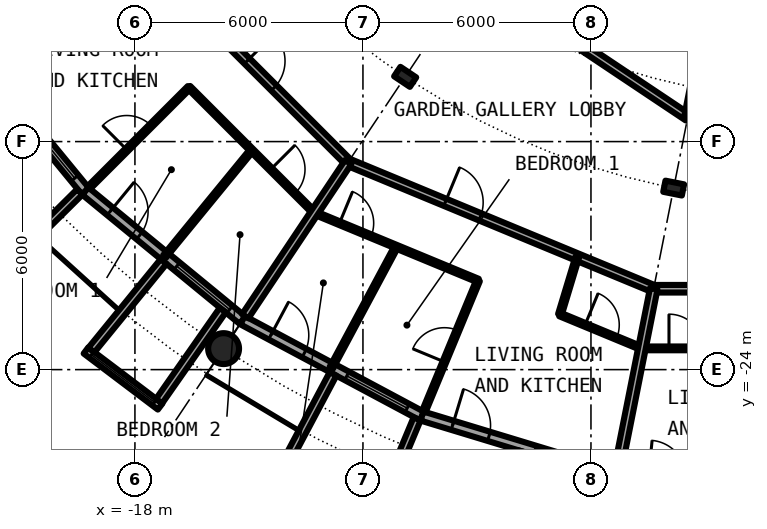
"""IFC4 building model, lengths in metres.
Left out: names, types, materials, properties, quantities, classifications, styles, units other than length and angle.
Written with IfcOpenShell. Run it as: python <this file> out.ifc"""

import sys

from ifc_helpers import new_model, si_unit, direction, frame, frame_2d, origin, origin_2d, place, context, subcontext, project, spatial, rectangle, circle, hollow_circle, i_section, extrude, element, fill, save


model = new_model("IFC4")
c1 = context("Model", 3, precision=1e-05, world=origin(), true_north=direction((0.0, 1.0)))
c2 = subcontext(c1, "Body", "Model", "MODEL_VIEW")
j1 = project(units=[si_unit("LENGTHUNIT", "METRE"), si_unit("PLANEANGLEUNIT", "RADIAN")], contexts=[c1])
p1 = place(None, origin())
s1 = spatial("IfcSite", under=j1, at=p1, CompositionType="ELEMENT")
p2 = place(p1, origin())
s2 = spatial("IfcBuilding", under=s1, at=p2, CompositionType="ELEMENT")
p3 = place(p2, frame((0.0, 0.0, 170.75)))
s3 = spatial("IfcBuildingStorey", under=s2, at=p3, CompositionType="ELEMENT", Elevation=170.75)
p4 = place(p3, frame((-15.667, -23.448, 0.0), z_axis=(0.0, 0.0, 1.0), x_axis=(1.0, 0.0, 0.0)))
e1 = element("IfcColumn", 1, at=p4, inside=s3, PredefinedType="COLUMN", context=c2, shape_type="SweptSolid", body=[
    extrude(hollow_circle(Radius=0.406, WallThickness=0.04, at=origin_2d()), origin(), (0.0, 0.0, 1.0), 3.05),
])
for number, where, z_axis, x_axis in (
    (2, (-10.889, -16.297, 0.0), (0.0, 0.0, 1.0), (-0.556, -0.831, 0.0)),
    (3, (-3.824, -19.223, 0.0), (0.0, 0.0, 1.0), (-0.195, -0.981, 0.0)),
):
    element("IfcColumn", number, at=place(p3, frame(where, z_axis=z_axis, x_axis=x_axis)), inside=s3, PredefinedType="COLUMN", context=c2, shape_type="SweptSolid", body=[
        extrude(i_section(OverallWidth=0.3, OverallDepth=0.5, WebThickness=0.014, FlangeThickness=0.028, FilletRadius=0.027, at=origin_2d()), origin(), (0.0, 0.0, 1.0), 3.05),
    ])
p5 = place(p3, frame((-22.699, -15.167, 0.0), z_axis=(0.0, 0.0, 1.0), x_axis=(0.634382322723, -0.773019449054, 0.0)))
e4 = element("IfcWall", 4, at=p5, inside=s3, PredefinedType="SOLIDWALL", context=c2, shape_type="SweptSolid", body=[
    extrude(rectangle(XDim=5.352, YDim=0.25, at=frame_2d((2.676, 0.0))), origin(), (0.0, 0.0, 1.0), 2.7),
])
p6 = place(p5, frame((0.841, 0.0, 0.0)))
e5 = element("IfcOpeningElement", 5, at=p6, cuts=e4, PredefinedType="OPENING", context=c2, shape_type="SweptSolid", body=[
    extrude(rectangle(XDim=1.0, YDim=2.2, at=frame_2d((0.5, 1.1))), frame((0.0, 0.135, 0.0), z_axis=(0.0, -1.0, 0.0), x_axis=(1.0, 0.0, 0.0)), (0.0, 0.0, 1.0), 0.27),
])
p7 = place(p5, frame((3.111, 0.0, 0.3)))
e6 = element("IfcOpeningElement", 6, at=p7, cuts=e4, PredefinedType="OPENING", context=c2, shape_type="SweptSolid", body=[
    extrude(rectangle(XDim=1.8, YDim=2.1, at=frame_2d((0.9, 1.05))), frame((0.0, 0.135, 0.0), z_axis=(0.0, -1.0, 0.0), x_axis=(1.0, 0.0, 0.0)), (0.0, 0.0, 1.0), 0.27),
])
p8 = place(p3, frame((-19.45, -19.323, -0.03), z_axis=(0.0, 0.0, 1.0), x_axis=(-0.709727076896, -0.704476739375, 0.0)))
e7 = element("IfcWall", 7, at=p8, inside=s3, PredefinedType="SOLIDWALL", context=c2, shape_type="SweptSolid", body=[
    extrude(rectangle(XDim=2.883, YDim=0.2, at=frame_2d((1.441, 0.0))), origin(), (0.0, 0.0, 1.0), 2.73),
])
p9 = place(p3, frame((-19.304, -19.304, 0.0), z_axis=(0.0, 0.0, 1.0), x_axis=(0.773019449054, -0.634382322723, 0.0)))
e8 = element("IfcWall", 8, at=p9, inside=s3, PredefinedType="SOLIDWALL", context=c2, shape_type="SweptSolid", body=[
    extrude(rectangle(XDim=5.352, YDim=0.25, at=frame_2d((2.676, 0.0))), origin(), (0.0, 0.0, 1.0), 2.7),
])
p10 = place(p9, frame((0.841, 0.0, 0.0)))
e9 = element("IfcOpeningElement", 9, at=p10, cuts=e8, PredefinedType="OPENING", context=c2, shape_type="SweptSolid", body=[
    extrude(rectangle(XDim=1.0, YDim=2.2, at=frame_2d((0.5, 1.1))), frame((0.0, 0.135, 0.0), z_axis=(0.0, -1.0, 0.0), x_axis=(1.0, 0.0, 0.0)), (0.0, 0.0, 1.0), 0.27),
])
p11 = place(p9, frame((3.111, 0.0, 0.3)))
e10 = element("IfcOpeningElement", 10, at=p11, cuts=e8, PredefinedType="OPENING", context=c2, shape_type="SweptSolid", body=[
    extrude(rectangle(XDim=1.8, YDim=2.1, at=frame_2d((0.9, 1.05))), frame((0.0, 0.135, 0.0), z_axis=(0.0, -1.0, 0.0), x_axis=(1.0, 0.0, 0.0)), (0.0, 0.0, 1.0), 0.27),
])
p12 = place(p3, frame((-19.289, -23.497, -0.03), z_axis=(0.0, 0.0, 1.0), x_axis=(0.797887588059, -0.602806268067, 0.0)))
e11 = element("IfcWall", 11, at=p12, inside=s3, PredefinedType="SOLIDWALL", context=c2, shape_type="SweptSolid", body=[
    extrude(rectangle(XDim=2.447, YDim=0.2, at=frame_2d((1.223, 0.0))), origin(), (0.0, 0.0, 1.0), 2.73),
])
p13 = place(p12, frame((0.183, 0.0, 0.33)))
e12 = element("IfcOpeningElement", 12, at=p13, cuts=e11, PredefinedType="OPENING", context=c2, shape_type="SweptSolid", body=[
    extrude(circle(Radius=1.04, at=frame_2d((1.04, 1.04))), frame((0.0, 0.11, 0.0), z_axis=(0.0, -1.0, 0.0), x_axis=(1.0, 0.0, 0.0)), (0.0, 0.0, 1.0), 0.22),
])
p14 = place(p3, frame((-17.246, -21.155, -0.03), z_axis=(0.0, 0.0, 1.0), x_axis=(-0.631741648902, -0.775179004516, 0.0)))
e13 = element("IfcWall", 13, at=p14, inside=s3, PredefinedType="SOLIDWALL", context=c2, shape_type="SweptSolid", body=[
    extrude(rectangle(XDim=3.006, YDim=0.2, at=frame_2d((1.503, 0.0))), origin(), (0.0, 0.0, 1.0), 2.73),
])
p15 = place(p3, frame((-15.688, -22.433, -0.03), z_axis=(0.0, 0.0, 1.0), x_axis=(-0.573260687834, -0.819373043115, 0.0)))
e14 = element("IfcWall", 14, at=p15, inside=s3, PredefinedType="SOLIDWALL", context=c2, shape_type="SweptSolid", body=[
    extrude(rectangle(XDim=2.925, YDim=0.2, at=frame_2d((1.463, 0.0))), origin(), (0.0, 0.0, 1.0), 2.73),
])
p16 = place(p3, frame((-15.167, -22.699, 0.0), z_axis=(0.0, 0.0, 1.0), x_axis=(0.881915646801, -0.471407246368, 0.0)))
e15 = element("IfcWall", 15, at=p16, inside=s3, PredefinedType="SOLIDWALL", context=c2, shape_type="SweptSolid", body=[
    extrude(rectangle(XDim=5.352, YDim=0.25, at=frame_2d((2.676, 0.0))), origin(), (0.0, 0.0, 1.0), 2.7),
])
p17 = place(p16, frame((0.841, 0.0, 0.0)))
e16 = element("IfcOpeningElement", 16, at=p17, cuts=e15, PredefinedType="OPENING", context=c2, shape_type="SweptSolid", body=[
    extrude(rectangle(XDim=1.0, YDim=2.2, at=frame_2d((0.5, 1.1))), frame((0.0, 0.135, 0.0), z_axis=(0.0, -1.0, 0.0), x_axis=(1.0, 0.0, 0.0)), (0.0, 0.0, 1.0), 0.27),
])
p18 = place(p16, frame((3.111, 0.0, 0.3)))
e17 = element("IfcOpeningElement", 17, at=p18, cuts=e15, PredefinedType="OPENING", context=c2, shape_type="SweptSolid", body=[
    extrude(rectangle(XDim=1.8, YDim=2.1, at=frame_2d((0.9, 1.05))), frame((0.0, 0.135, 0.0), z_axis=(0.0, -1.0, 0.0), x_axis=(1.0, 0.0, 0.0)), (0.0, 0.0, 1.0), 0.27),
])
p19 = place(p3, frame((-12.787, -24.113, -0.03), z_axis=(0.0, 0.0, 1.0), x_axis=(-0.468365282436, -0.883534924159, 0.0)))
e18 = element("IfcWall", 18, at=p19, inside=s3, PredefinedType="SOLIDWALL", context=c2, shape_type="SweptSolid", body=[
    extrude(rectangle(XDim=3.006, YDim=0.2, at=frame_2d((1.503, 0.0))), origin(), (0.0, 0.0, 1.0), 2.73),
])
p20 = place(p3, frame((-10.575, -25.295, -0.03), z_axis=(0.0, 0.0, 1.0), x_axis=(-0.385697364644, -0.922625353492, 0.0)))
e19 = element("IfcWall", 19, at=p20, inside=s3, PredefinedType="SOLIDWALL", context=c2, shape_type="SweptSolid", body=[
    extrude(rectangle(XDim=2.883, YDim=0.2, at=frame_2d((1.442, 0.0))), origin(), (0.0, 0.0, 1.0), 2.73),
])
p21 = place(p3, frame((-10.447, -25.222, 0.0), z_axis=(0.0, 0.0, 1.0), x_axis=(0.956965678721, -0.290201119486, 0.0)))
e20 = element("IfcWall", 20, at=p21, inside=s3, PredefinedType="SOLIDWALL", context=c2, shape_type="SweptSolid", body=[
    extrude(rectangle(XDim=5.351, YDim=0.25, at=frame_2d((2.676, 0.0))), origin(), (0.0, 0.0, 1.0), 2.7),
])
p22 = place(p21, frame((0.841, 0.0, 0.0)))
e21 = element("IfcOpeningElement", 21, at=p22, cuts=e20, PredefinedType="OPENING", context=c2, shape_type="SweptSolid", body=[
    extrude(rectangle(XDim=1.0, YDim=2.2, at=frame_2d((0.5, 1.1))), frame((0.0, 0.135, 0.0), z_axis=(0.0, -1.0, 0.0), x_axis=(1.0, 0.0, 0.0)), (0.0, 0.0, 1.0), 0.27),
])
p23 = place(p21, frame((3.111, 0.0, 0.3)))
e22 = element("IfcOpeningElement", 22, at=p23, cuts=e20, PredefinedType="OPENING", context=c2, shape_type="SweptSolid", body=[
    extrude(rectangle(XDim=1.8, YDim=2.1, at=frame_2d((0.9, 1.05))), frame((0.0, 0.135, 0.0), z_axis=(0.0, -1.0, 0.0), x_axis=(1.0, 0.0, 0.0)), (0.0, 0.0, 1.0), 0.27),
])
p24 = place(p3, frame((-16.581, -16.571, 0.0), z_axis=(0.0, 0.0, 1.0), x_axis=(0.706923494552, -0.707290020325, 0.0)))
e23 = element("IfcWall", 23, at=p24, inside=s3, PredefinedType="PARTITIONING", context=c2, shape_type="SweptSolid", body=[
    extrude(rectangle(XDim=4.663, YDim=0.1, at=frame_2d((2.331, 0.0))), origin(), (0.0, 0.0, 1.0), 2.7),
])
p25 = place(p24, frame((3.051, 0.0, 0.0)))
e24 = element("IfcOpeningElement", 24, at=p25, cuts=e23, PredefinedType="OPENING", context=c2, shape_type="SweptSolid", body=[
    extrude(rectangle(XDim=0.9, YDim=2.3, at=frame_2d((0.45, 1.15))), frame((0.0, 0.06, 0.0), z_axis=(0.0, -1.0, 0.0), x_axis=(1.0, 0.0, 0.0)), (0.0, 0.0, 1.0), 0.12),
])
p26 = place(p3, frame((-13.278, -19.873, 0.0), z_axis=(0.0, 0.0, 1.0), x_axis=(0.923920484476, -0.38258455061, 0.0)))
e25 = element("IfcWall", 25, at=p26, inside=s3, PredefinedType="PARTITIONING", context=c2, shape_type="SweptSolid", body=[
    extrude(rectangle(XDim=4.663, YDim=0.1, at=frame_2d((2.332, 0.0))), origin(), (0.0, 0.0, 1.0), 2.7),
])
p27 = place(p26, frame((0.715, 0.0, 0.0)))
e26 = element("IfcOpeningElement", 26, at=p27, cuts=e25, PredefinedType="OPENING", context=c2, shape_type="SweptSolid", body=[
    extrude(rectangle(XDim=0.9, YDim=2.3, at=frame_2d((0.45, 1.15))), frame((0.0, 0.06, 0.0), z_axis=(0.0, -1.0, 0.0), x_axis=(1.0, 0.0, 0.0)), (0.0, 0.0, 1.0), 0.12),
])
p28 = place(p3, frame((-6.817, -22.549, 0.0), z_axis=(0.0, 0.0, 1.0), x_axis=(0.923923664861, -0.382576870068, 0.0)))
e27 = element("IfcWall", 27, at=p28, inside=s3, PredefinedType="PARTITIONING", context=c2, shape_type="SweptSolid", body=[
    extrude(rectangle(XDim=2.331, YDim=0.1, at=frame_2d((1.166, 0.0))), origin(), (0.0, 0.0, 1.0), 2.7),
])
p29 = place(p28, frame((0.716, 0.0, 0.0)))
e28 = element("IfcOpeningElement", 28, at=p29, cuts=e27, PredefinedType="OPENING", context=c2, shape_type="SweptSolid", body=[
    extrude(rectangle(XDim=0.9, YDim=2.3, at=frame_2d((0.45, 1.15))), frame((0.0, 0.06, 0.0), z_axis=(0.0, -1.0, 0.0), x_axis=(1.0, 0.0, 0.0)), (0.0, 0.0, 1.0), 0.12),
])
p30 = place(p3, frame((-4.663, -23.441, 0.0), z_axis=(0.0, 0.0, 1.0), x_axis=(1.0, 0.0, 0.0)))
e29 = element("IfcWall", 29, at=p30, inside=s3, PredefinedType="PARTITIONING", context=c2, shape_type="SweptSolid", body=[
    extrude(rectangle(XDim=2.332, YDim=0.1, at=frame_2d((1.166, 0.0))), origin(), (0.0, 0.0, 1.0), 2.7),
])
p31 = place(p30, frame((0.716, 0.0, 0.0)))
e30 = element("IfcOpeningElement", 30, at=p31, cuts=e29, PredefinedType="OPENING", context=c2, shape_type="SweptSolid", body=[
    extrude(rectangle(XDim=0.9, YDim=2.3, at=frame_2d((0.45, 1.15))), frame((0.0, 0.06, 0.0), z_axis=(0.0, -1.0, 0.0), x_axis=(1.0, 0.0, 0.0)), (0.0, 0.0, 1.0), 0.12),
])
p32 = place(p3, frame((-18.542, -12.389, 0.0), z_axis=(0.0, 0.0, 1.0), x_axis=(0.707106781187, -0.707106781187, 0.0)))
e31 = element("IfcWall", 31, at=p32, inside=s3, PredefinedType="PARTITIONING", context=c2, shape_type="SweptSolid", body=[
    extrude(rectangle(XDim=8.702, YDim=0.2, at=frame_2d((4.351, 0.0))), origin(), (0.0, 0.0, 1.0), 2.7),
])
p33 = place(p32, frame((4.938, 0.0, 0.0)))
e32 = element("IfcOpeningElement", 32, at=p33, cuts=e31, PredefinedType="OPENING", context=c2, shape_type="SweptSolid", body=[
    extrude(rectangle(XDim=1.0, YDim=2.3, at=frame_2d((0.5, 1.15))), frame((0.0, 0.11, 0.0), z_axis=(0.0, -1.0, 0.0), x_axis=(1.0, 0.0, 0.0)), (0.0, 0.0, 1.0), 0.22),
])
p34 = place(p3, frame((-12.389, -18.542, 0.0), z_axis=(0.0, 0.0, 1.0), x_axis=(0.923867858178, -0.382711615483, 0.0)))
e33 = element("IfcWall", 33, at=p34, inside=s3, PredefinedType="PARTITIONING", context=c2, shape_type="SweptSolid", body=[
    extrude(rectangle(XDim=8.709, YDim=0.2, at=frame_2d((4.354, 0.0))), origin(), (0.0, 0.0, 1.0), 2.7),
])
p35 = place(p34, frame((2.763, 0.0, 0.0)))
e34 = element("IfcOpeningElement", 34, at=p35, cuts=e33, PredefinedType="OPENING", context=c2, shape_type="SweptSolid", body=[
    extrude(rectangle(XDim=1.0, YDim=2.3, at=frame_2d((0.5, 1.15))), frame((0.0, 0.11, 0.0), z_axis=(0.0, -1.0, 0.0), x_axis=(1.0, 0.0, 0.0)), (0.0, 0.0, 1.0), 0.22),
])
p36 = place(p3, frame((-4.351, -21.872, 0.0), z_axis=(0.0, 0.0, 1.0), x_axis=(1.0, 0.0, 0.0)))
e35 = element("IfcWall", 35, at=p36, inside=s3, PredefinedType="PARTITIONING", context=c2, shape_type="SweptSolid", body=[
    extrude(rectangle(XDim=8.702, YDim=0.2, at=frame_2d((4.351, 0.0))), origin(), (0.0, 0.0, 1.0), 2.7),
])
p37 = place(p36, frame((4.939, 0.0, 0.0)))
e36 = element("IfcOpeningElement", 36, at=p37, cuts=e35, PredefinedType="OPENING", context=c2, shape_type="SweptSolid", body=[
    extrude(rectangle(XDim=1.0, YDim=2.3, at=frame_2d((0.5, 1.15))), frame((0.0, 0.11, 0.0), z_axis=(0.0, -1.0, 0.0), x_axis=(1.0, 0.0, 0.0)), (0.0, 0.0, 1.0), 0.22),
])
p38 = place(p3, frame((-13.309, -10.775, 0.0), z_axis=(0.0, 0.0, 1.0), x_axis=(0.831501812692, -0.555522038708, 0.0)))
e37 = element("IfcWall", 37, at=p38, inside=s3, PredefinedType="PARTITIONING", context=c2, shape_type="SweptSolid", body=[
    extrude(rectangle(XDim=11.856, YDim=0.2, at=frame_2d((5.928, 0.0))), origin(), (0.0, 0.0, 1.0), 2.7),
])
p39 = place(p38, frame((6.272, 0.0, 0.0)))
e38 = element("IfcOpeningElement", 38, at=p39, cuts=e37, PredefinedType="OPENING", context=c2, shape_type="SweptSolid", body=[
    extrude(rectangle(XDim=1.0, YDim=2.3, at=frame_2d((0.5, 1.15))), frame((0.0, 0.11, 0.0), z_axis=(0.0, -1.0, 0.0), x_axis=(1.0, 0.0, 0.0)), (0.0, 0.0, 1.0), 0.22),
])
p40 = place(p3, frame((-6.817, -22.549, 0.0), z_axis=(0.0, 0.0, 1.0), x_axis=(0.289547780579, 0.957163561134, 0.0)))
e39 = element("IfcWall", 39, at=p40, inside=s3, PredefinedType="PARTITIONING", context=c2, shape_type="SweptSolid", body=[
    extrude(rectangle(XDim=1.578, YDim=0.1, at=frame_2d((0.789, 0.0))), origin(), (0.0, 0.0, 1.0), 2.7),
])
p41 = place(p3, frame((-19.216, -19.216, 0.0), z_axis=(0.0, 0.0, 1.0), x_axis=(0.707106781187, 0.707106781187, 0.0)))
e40 = element("IfcWall", 40, at=p41, inside=s3, PredefinedType="PARTITIONING", context=c2, shape_type="SweptSolid", body=[
    extrude(rectangle(XDim=3.735, YDim=0.1, at=frame_2d((1.868, 0.0))), origin(), (0.0, 0.0, 1.0), 2.7),
])
p42 = place(p41, frame((1.417, 0.0, 0.0)))
e41 = element("IfcOpeningElement", 41, at=p42, cuts=e40, PredefinedType="OPENING", context=c2, shape_type="SweptSolid", body=[
    extrude(rectangle(XDim=0.9, YDim=2.3, at=frame_2d((0.45, 1.15))), frame((0.0, 0.06, 0.0), z_axis=(0.0, -1.0, 0.0), x_axis=(1.0, 0.0, 0.0)), (0.0, 0.0, 1.0), 0.12),
])
p43 = place(p3, frame((-17.22, -21.023, 0.0), z_axis=(0.0, 0.0, 1.0), x_axis=(0.633737383709, 0.773548271597, 0.0)))
e42 = element("IfcWall", 42, at=p43, inside=s3, PredefinedType="PARTITIONING", context=c2, shape_type="SweptSolid", body=[
    extrude(rectangle(XDim=3.618, YDim=0.1, at=frame_2d((1.809, 0.0))), origin(), (0.0, 0.0, 1.0), 2.7),
])
p44 = place(p3, frame((-15.097, -22.596, 0.0), z_axis=(0.0, 0.0, 1.0), x_axis=(0.555462686211, 0.831541462723, 0.0)))
e43 = element("IfcWall", 43, at=p44, inside=s3, PredefinedType="PARTITIONING", context=c2, shape_type="SweptSolid", body=[
    extrude(rectangle(XDim=4.875, YDim=0.2, at=frame_2d((2.438, 0.0))), origin(), (0.0, 0.0, 1.0), 2.7),
])
p45 = place(p3, frame((-12.833, -23.954, 0.0), z_axis=(0.0, 0.0, 1.0), x_axis=(0.472212052488, 0.881484984265, 0.0)))
e44 = element("IfcWall", 44, at=p45, inside=s3, PredefinedType="PARTITIONING", context=c2, shape_type="SweptSolid", body=[
    extrude(rectangle(XDim=3.619, YDim=0.1, at=frame_2d((1.81, 0.0))), origin(), (0.0, 0.0, 1.0), 2.7),
])
p46 = place(p3, frame((-10.399, -25.106, 0.0), z_axis=(0.0, 0.0, 1.0), x_axis=(0.382669377748, 0.923885353999, 0.0)))
e45 = element("IfcWall", 45, at=p46, inside=s3, PredefinedType="PARTITIONING", context=c2, shape_type="SweptSolid", body=[
    extrude(rectangle(XDim=3.734, YDim=0.1, at=frame_2d((1.867, 0.0))), origin(), (0.0, 0.0, 1.0), 2.7),
])
p47 = place(p46, frame((1.417, 0.0, 0.0)))
e46 = element("IfcOpeningElement", 46, at=p47, cuts=e45, PredefinedType="OPENING", context=c2, shape_type="SweptSolid", body=[
    extrude(rectangle(XDim=0.9, YDim=2.3, at=frame_2d((0.45, 1.15))), frame((0.0, 0.06, 0.0), z_axis=(0.0, -1.0, 0.0), x_axis=(1.0, 0.0, 0.0)), (0.0, 0.0, 1.0), 0.12),
])
p48 = place(p3, frame((-5.298, -26.654, 0.0), z_axis=(0.0, 0.0, 1.0), x_axis=(0.194931286287, 0.980816901173, 0.0)))
e47 = element("IfcWall", 47, at=p48, inside=s3, PredefinedType="PARTITIONING", context=c2, shape_type="SweptSolid", body=[
    extrude(rectangle(XDim=4.875, YDim=0.2, at=frame_2d((2.437, 0.0))), origin(), (0.0, 0.0, 1.0), 2.7),
])
p49 = place(p3, frame((-3.45, -17.36, 0.0), z_axis=(0.0, 0.0, 1.0), x_axis=(0.195001023206, 0.980803038815, 0.0)))
e48 = element("IfcWall", 48, at=p49, inside=s3, PredefinedType="PARTITIONING", context=c2, shape_type="SweptSolid", body=[
    extrude(rectangle(XDim=9.98, YDim=0.2, at=frame_2d((4.99, 0.0))), origin(), (0.0, 0.0, 1.0), 2.7),
])
p50 = place(p7, origin())
e49 = element("IfcWindow", 49, at=p50, inside=s3, PartitioningType="SINGLE_PANEL", PredefinedType="WINDOW", context=c2, shape_type="SweptSolid", body=[
    extrude(rectangle(XDim=1.8, YDim=2.1, at=frame_2d((0.9, 1.05))), frame((0.0, 0.03, 0.0), z_axis=(0.0, -1.0, 0.0), x_axis=(1.0, 0.0, 0.0)), (0.0, 0.0, 1.0), 0.06),
])
fill(e6, e49)
p51 = place(p10, origin())
e50 = element("IfcDoor", 50, at=p51, inside=s3, OperationType="SINGLE_SWING_LEFT", PredefinedType="DOOR", context=c2, shape_type="SweptSolid", body=[
    extrude(rectangle(XDim=1.0, YDim=2.2, at=frame_2d((0.5, 1.1))), frame((0.0, 0.025, 0.0), z_axis=(0.0, -1.0, 0.0), x_axis=(1.0, 0.0, 0.0)), (0.0, 0.0, 1.0), 0.05),
])
fill(e9, e50)
p52 = place(p11, origin())
e51 = element("IfcWindow", 51, at=p52, inside=s3, PartitioningType="SINGLE_PANEL", PredefinedType="WINDOW", context=c2, shape_type="SweptSolid", body=[
    extrude(rectangle(XDim=1.8, YDim=2.1, at=frame_2d((0.9, 1.05))), frame((0.0, 0.03, 0.0), z_axis=(0.0, -1.0, 0.0), x_axis=(1.0, 0.0, 0.0)), (0.0, 0.0, 1.0), 0.06),
])
fill(e10, e51)
p53 = place(p13, origin())
e52 = element("IfcWindow", 52, at=p53, inside=s3, PartitioningType="SINGLE_PANEL", PredefinedType="WINDOW", context=c2, shape_type="SweptSolid", body=[
    extrude(circle(Radius=1.04, at=frame_2d((1.04, 1.04))), frame((0.0, 0.03, 0.0), z_axis=(0.0, -1.0, 0.0), x_axis=(1.0, 0.0, 0.0)), (0.0, 0.0, 1.0), 0.06),
])
fill(e12, e52)
p54 = place(p17, origin())
e53 = element("IfcDoor", 53, at=p54, inside=s3, OperationType="SINGLE_SWING_LEFT", PredefinedType="DOOR", context=c2, shape_type="SweptSolid", body=[
    extrude(rectangle(XDim=1.0, YDim=2.2, at=frame_2d((0.5, 1.1))), frame((0.0, 0.025, 0.0), z_axis=(0.0, -1.0, 0.0), x_axis=(1.0, 0.0, 0.0)), (0.0, 0.0, 1.0), 0.05),
])
fill(e16, e53)
p55 = place(p18, origin())
e54 = element("IfcWindow", 54, at=p55, inside=s3, PartitioningType="SINGLE_PANEL", PredefinedType="WINDOW", context=c2, shape_type="SweptSolid", body=[
    extrude(rectangle(XDim=1.8, YDim=2.1, at=frame_2d((0.9, 1.05))), frame((0.0, 0.03, 0.0), z_axis=(0.0, -1.0, 0.0), x_axis=(1.0, 0.0, 0.0)), (0.0, 0.0, 1.0), 0.06),
])
fill(e17, e54)
p56 = place(p22, origin())
e55 = element("IfcDoor", 55, at=p56, inside=s3, OperationType="SINGLE_SWING_LEFT", PredefinedType="DOOR", context=c2, shape_type="SweptSolid", body=[
    extrude(rectangle(XDim=1.0, YDim=2.2, at=frame_2d((0.5, 1.1))), frame((0.0, 0.025, 0.0), z_axis=(0.0, -1.0, 0.0), x_axis=(1.0, 0.0, 0.0)), (0.0, 0.0, 1.0), 0.05),
])
fill(e21, e55)
p57 = place(p33, origin())
e56 = element("IfcDoor", 56, at=p57, inside=s3, OperationType="SINGLE_SWING_RIGHT", PredefinedType="DOOR", context=c2, shape_type="SweptSolid", body=[
    extrude(rectangle(XDim=1.0, YDim=2.3, at=frame_2d((0.5, 1.15))), frame((0.0, 0.025, 0.0), z_axis=(0.0, -1.0, 0.0), x_axis=(1.0, 0.0, 0.0)), (0.0, 0.0, 1.0), 0.05),
])
fill(e32, e56)
p58 = place(p42, origin())
e57 = element("IfcDoor", 57, at=p58, inside=s3, OperationType="SINGLE_SWING_LEFT", PredefinedType="DOOR", context=c2, shape_type="SweptSolid", body=[
    extrude(rectangle(XDim=0.9, YDim=2.3, at=frame_2d((0.45, 1.15))), frame((0.0, 0.025, 0.0), z_axis=(0.0, -1.0, 0.0), x_axis=(1.0, 0.0, 0.0)), (0.0, 0.0, 1.0), 0.05),
])
fill(e41, e57)
p59 = place(p25, origin())
e58 = element("IfcDoor", 58, at=p59, inside=s3, OperationType="SINGLE_SWING_RIGHT", PredefinedType="DOOR", context=c2, shape_type="SweptSolid", body=[
    extrude(rectangle(XDim=0.9, YDim=2.3, at=frame_2d((0.45, 1.15))), frame((0.0, 0.025, 0.0), z_axis=(0.0, -1.0, 0.0), x_axis=(1.0, 0.0, 0.0)), (0.0, 0.0, 1.0), 0.05),
])
fill(e24, e58)
p60 = place(p35, origin())
e59 = element("IfcDoor", 59, at=p60, inside=s3, OperationType="SINGLE_SWING_LEFT", PredefinedType="DOOR", context=c2, shape_type="SweptSolid", body=[
    extrude(rectangle(XDim=1.0, YDim=2.3, at=frame_2d((0.5, 1.15))), frame((0.0, 0.025, 0.0), z_axis=(0.0, -1.0, 0.0), x_axis=(1.0, 0.0, 0.0)), (0.0, 0.0, 1.0), 0.05),
])
fill(e34, e59)
p61 = place(p29, origin())
e60 = element("IfcDoor", 60, at=p61, inside=s3, OperationType="SINGLE_SWING_LEFT", PredefinedType="DOOR", context=c2, shape_type="SweptSolid", body=[
    extrude(rectangle(XDim=0.9, YDim=2.3, at=frame_2d((0.45, 1.15))), frame((0.0, 0.025, 0.0), z_axis=(0.0, -1.0, 0.0), x_axis=(1.0, 0.0, 0.0)), (0.0, 0.0, 1.0), 0.05),
])
fill(e28, e60)
p62 = place(p47, origin())
e61 = element("IfcDoor", 61, at=p62, inside=s3, OperationType="SINGLE_SWING_RIGHT", PredefinedType="DOOR", context=c2, shape_type="SweptSolid", body=[
    extrude(rectangle(XDim=0.9, YDim=2.3, at=frame_2d((0.45, 1.15))), frame((0.0, 0.025, 0.0), z_axis=(0.0, -1.0, 0.0), x_axis=(1.0, 0.0, 0.0)), (0.0, 0.0, 1.0), 0.05),
])
fill(e46, e61)
p63 = place(p27, origin())
e62 = element("IfcDoor", 62, at=p63, inside=s3, OperationType="SINGLE_SWING_LEFT", PredefinedType="DOOR", context=c2, shape_type="SweptSolid", body=[
    extrude(rectangle(XDim=0.9, YDim=2.3, at=frame_2d((0.45, 1.15))), frame((0.0, 0.025, 0.0), z_axis=(0.0, -1.0, 0.0), x_axis=(1.0, 0.0, 0.0)), (0.0, 0.0, 1.0), 0.05),
])
fill(e26, e62)
p64 = place(p31, origin())
e63 = element("IfcDoor", 63, at=p64, inside=s3, OperationType="SINGLE_SWING_RIGHT", PredefinedType="DOOR", context=c2, shape_type="SweptSolid", body=[
    extrude(rectangle(XDim=0.9, YDim=2.3, at=frame_2d((0.45, 1.15))), frame((0.0, 0.025, 0.0), z_axis=(0.0, -1.0, 0.0), x_axis=(1.0, 0.0, 0.0)), (0.0, 0.0, 1.0), 0.05),
])
fill(e30, e63)
save(model, sys.argv[1])
